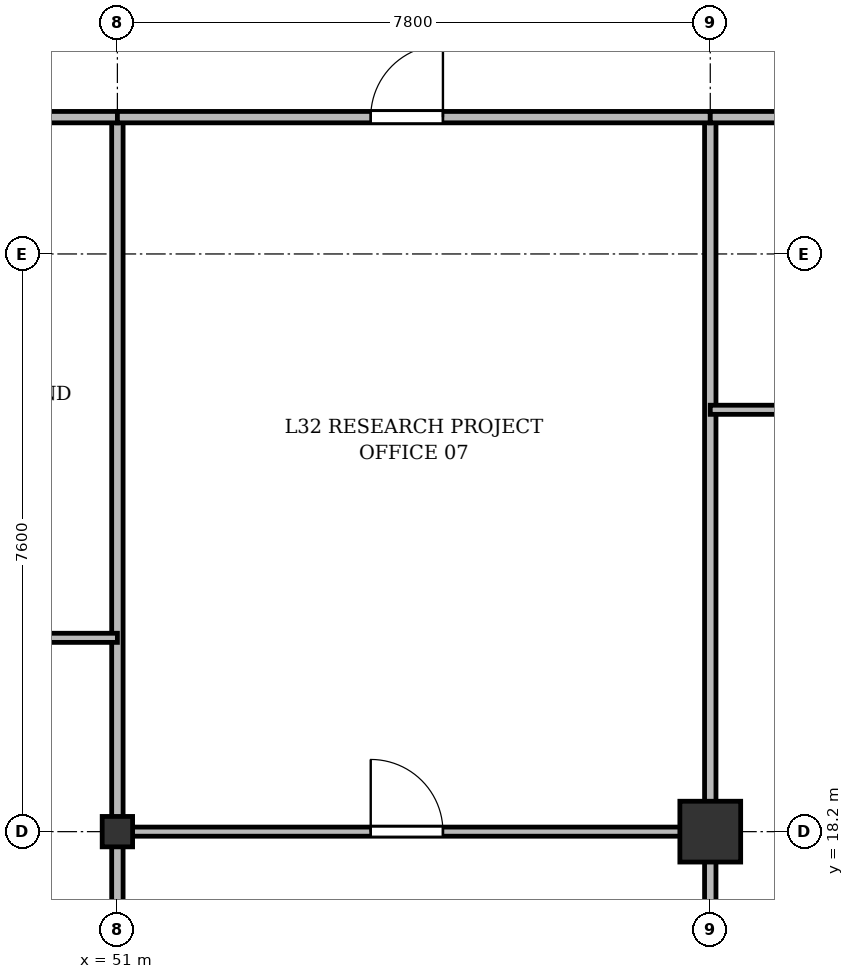
"""IFC4 building model, lengths in metres.
Left out: names, types, materials, properties, quantities, classifications, styles, units other than length and angle.
Written with IfcOpenShell. Run it as: python <this file> out.ifc"""

import sys

from ifc_helpers import new_model, si_unit, direction, frame, frame_2d, origin, origin_2d, place, context, subcontext, project, spatial, rectangle, i_section, extrude, source, transform, mapped, element, fill, save


model = new_model("IFC4")
c1 = context("Model", 3, precision=1e-05, world=origin(), true_north=direction((0.0, 1.0)))
c2 = subcontext(c1, "Body", "Model", "MODEL_VIEW")
j1 = project(units=[si_unit("LENGTHUNIT", "METRE"), si_unit("PLANEANGLEUNIT", "RADIAN")], contexts=[c1])
p1 = place(None, origin())
s1 = spatial("IfcSite", under=j1, at=p1, CompositionType="ELEMENT")
p2 = place(p1, origin())
s2 = spatial("IfcBuilding", under=s1, at=p2, CompositionType="ELEMENT")
p3 = place(p2, frame((0.0, 0.0, 124.9)))
s3 = spatial("IfcBuildingStorey", under=s2, at=p3, CompositionType="ELEMENT", Elevation=124.9)
m1 = source(origin(), c2, "Body", "SweptSolid", [
    extrude(i_section(OverallWidth=0.4, OverallDepth=0.4, WebThickness=0.022, FlangeThickness=0.035, at=origin_2d()), origin(), (0.0, 0.0, 1.0), 3.6),
])
p4 = place(p3, frame((51.0, 18.2, 0.0), z_axis=(0.0, 0.0, 1.0), x_axis=(1.0, 0.0, 0.0)))
e1 = element("IfcColumn", 1, at=p4, inside=s3, PredefinedType="COLUMN", context=c2, shape_type="MappedRepresentation", body=[
    mapped(m1, transform((0.0, 0.0, 0.0), x_axis=(1.0, 0.0, 0.0), y_axis=(0.0, 1.0, 0.0), z_axis=(0.0, 0.0, 1.0), scale=1.0)),
])
m2 = source(origin(), c2, "Body", "SweptSolid", [
    extrude(rectangle(XDim=0.8, YDim=0.8, at=origin_2d()), origin(), (0.0, 0.0, 1.0), 3.6),
])
p5 = place(p3, frame((58.8, 18.2, 0.0), z_axis=(0.0, 0.0, 1.0), x_axis=(1.0, 0.0, 0.0)))
e2 = element("IfcColumn", 2, at=p5, inside=s3, PredefinedType="COLUMN", context=c2, shape_type="MappedRepresentation", body=[
    mapped(m2, transform((0.0, 0.0, 0.0), x_axis=(1.0, 0.0, 0.0), y_axis=(0.0, 1.0, 0.0), z_axis=(0.0, 0.0, 1.0), scale=1.0)),
])
p6 = place(p3, frame((51.0, 6.41, 0.0), z_axis=(0.0, 0.0, 1.0), x_axis=(0.0, 1.0, 0.0)))
e3 = element("IfcWall", 3, at=p6, inside=s3, PredefinedType="PARTITIONING", context=c2, shape_type="SweptSolid", body=[
    extrude(rectangle(XDim=21.19, YDim=0.15, at=frame_2d((10.595, 0.0))), origin(), (0.0, 0.0, 1.0), 2.84),
])
p7 = place(p3, frame((58.8, 3.145, 0.0), z_axis=(0.0, 0.0, 1.0), x_axis=(0.0, 1.0, 0.0)))
e4 = element("IfcWall", 4, at=p7, inside=s3, PredefinedType="PARTITIONING", context=c2, shape_type="SweptSolid", body=[
    extrude(rectangle(XDim=24.455, YDim=0.15, at=frame_2d((12.228, 0.0))), origin(), (0.0, 0.0, 1.0), 2.84),
])
p8 = place(p3, frame((43.8, 20.75, 0.0), z_axis=(0.0, 0.0, 1.0), x_axis=(1.0, 0.0, 0.0)))
e5 = element("IfcWall", 5, at=p8, inside=s3, PredefinedType="PARTITIONING", context=c2, shape_type="SweptSolid", body=[
    extrude(rectangle(XDim=7.2, YDim=0.12, at=frame_2d((3.6, 0.0))), origin(), (0.0, 0.0, 1.0), 2.84),
])
p9 = place(p8, frame((3.125, 0.0, 0.0)))
e6 = element("IfcOpeningElement", 6, at=p9, cuts=e5, PredefinedType="OPENING", context=c2, shape_type="SweptSolid", body=[
    extrude(rectangle(XDim=0.95, YDim=2.15, at=frame_2d((0.475, 1.075))), frame((0.0, 0.07, 0.0), z_axis=(0.0, -1.0, 0.0), x_axis=(1.0, 0.0, 0.0)), (0.0, 0.0, 1.0), 0.14),
])
p10 = place(p3, frame((43.8, 27.6, 0.0), z_axis=(0.0, 0.0, 1.0), x_axis=(1.0, 0.0, 0.0)))
e7 = element("IfcWall", 7, at=p10, inside=s3, PredefinedType="PARTITIONING", context=c2, shape_type="SweptSolid", body=[
    extrude(rectangle(XDim=7.2, YDim=0.15, at=frame_2d((3.6, 0.0))), origin(), (0.0, 0.0, 1.0), 2.84),
])
p11 = place(p10, frame((4.706, 0.0, 0.0)))
e8 = element("IfcOpeningElement", 8, at=p11, cuts=e7, PredefinedType="OPENING", context=c2, shape_type="SweptSolid", body=[
    extrude(rectangle(XDim=0.95, YDim=2.15, at=frame_2d((0.475, 1.075))), frame((0.0, 0.085, 0.0), z_axis=(0.0, -1.0, 0.0), x_axis=(1.0, 0.0, 0.0)), (0.0, 0.0, 1.0), 0.17),
])
p12 = place(p3, frame((51.0, 27.6, 0.0), z_axis=(0.0, 0.0, 1.0), x_axis=(1.0, 0.0, 0.0)))
e9 = element("IfcWall", 9, at=p12, inside=s3, PredefinedType="PARTITIONING", context=c2, shape_type="SweptSolid", body=[
    extrude(rectangle(XDim=7.8, YDim=0.15, at=frame_2d((3.9, 0.0))), origin(), (0.0, 0.0, 1.0), 2.84),
])
p13 = place(p12, frame((3.333, 0.0, 0.0)))
e10 = element("IfcOpeningElement", 10, at=p13, cuts=e9, PredefinedType="OPENING", context=c2, shape_type="SweptSolid", body=[
    extrude(rectangle(XDim=0.95, YDim=2.15, at=frame_2d((0.475, 1.075))), frame((0.0, 0.085, 0.0), z_axis=(0.0, -1.0, 0.0), x_axis=(1.0, 0.0, 0.0)), (0.0, 0.0, 1.0), 0.17),
])
p14 = place(p3, frame((51.0, 18.2, 0.0), z_axis=(0.0, 0.0, 1.0), x_axis=(1.0, 0.0, 0.0)))
e11 = element("IfcWall", 11, at=p14, inside=s3, PredefinedType="PARTITIONING", context=c2, shape_type="SweptSolid", body=[
    extrude(rectangle(XDim=7.8, YDim=0.12, at=frame_2d((3.9, 0.0))), origin(), (0.0, 0.0, 1.0), 2.752),
])
p15 = place(p14, frame((3.333, 0.0, 0.0)))
e12 = element("IfcOpeningElement", 12, at=p15, cuts=e11, PredefinedType="OPENING", context=c2, shape_type="SweptSolid", body=[
    extrude(rectangle(XDim=0.95, YDim=2.15, at=frame_2d((0.475, 1.075))), frame((0.0, 0.07, 0.0), z_axis=(0.0, -1.0, 0.0), x_axis=(1.0, 0.0, 0.0)), (0.0, 0.0, 1.0), 0.14),
])
p16 = place(p3, frame((58.8, 27.6, 0.0), z_axis=(0.0, 0.0, 1.0), x_axis=(1.0, 0.0, 0.0)))
e13 = element("IfcWall", 13, at=p16, inside=s3, PredefinedType="PARTITIONING", context=c2, shape_type="SweptSolid", body=[
    extrude(rectangle(XDim=6.8, YDim=0.15, at=frame_2d((3.4, 0.0))), origin(), (0.0, 0.0, 1.0), 2.84),
])
p17 = place(p16, frame((2.925, 0.0, 0.0)))
e14 = element("IfcOpeningElement", 14, at=p17, cuts=e13, PredefinedType="OPENING", context=c2, shape_type="SweptSolid", body=[
    extrude(rectangle(XDim=0.95, YDim=2.15, at=frame_2d((0.475, 1.075))), frame((0.0, 0.085, 0.0), z_axis=(0.0, -1.0, 0.0), x_axis=(1.0, 0.0, 0.0)), (0.0, 0.0, 1.0), 0.17),
])
p18 = place(p3, frame((58.8, 23.75, 0.0), z_axis=(0.0, 0.0, 1.0), x_axis=(1.0, 0.0, 0.0)))
e15 = element("IfcWall", 15, at=p18, inside=s3, PredefinedType="PARTITIONING", context=c2, shape_type="SweptSolid", body=[
    extrude(rectangle(XDim=6.8, YDim=0.12, at=frame_2d((3.4, 0.0))), origin(), (0.0, 0.0, 1.0), 2.84),
])
p19 = place(p18, frame((2.925, 0.0, 0.0)))
e16 = element("IfcOpeningElement", 16, at=p19, cuts=e15, PredefinedType="OPENING", context=c2, shape_type="SweptSolid", body=[
    extrude(rectangle(XDim=0.95, YDim=2.15, at=frame_2d((0.475, 1.075))), frame((0.0, 0.07, 0.0), z_axis=(0.0, -1.0, 0.0), x_axis=(1.0, 0.0, 0.0)), (0.0, 0.0, 1.0), 0.14),
])
m3 = source(origin(), c2, "Body", "SweptSolid", [
    extrude(rectangle(XDim=0.95, YDim=2.15, at=frame_2d((0.475, 1.075))), frame((0.0, 0.025, 0.0), z_axis=(0.0, -1.0, 0.0), x_axis=(1.0, 0.0, 0.0)), (0.0, 0.0, 1.0), 0.05),
])
p20 = place(p13, origin())
e17 = element("IfcDoor", 17, at=p20, inside=s3, OperationType="SINGLE_SWING_RIGHT", PredefinedType="DOOR", context=c2, shape_type="MappedRepresentation", body=[
    mapped(m3, transform((0.0, 0.0, 0.0), x_axis=(1.0, 0.0, 0.0), y_axis=(0.0, 1.0, 0.0), z_axis=(0.0, 0.0, 1.0), scale=1.0)),
])
fill(e10, e17)
p21 = place(p15, origin())
e18 = element("IfcDoor", 18, at=p21, inside=s3, OperationType="SINGLE_SWING_LEFT", PredefinedType="DOOR", context=c2, shape_type="MappedRepresentation", body=[
    mapped(m3, transform((0.0, 0.0, 0.0), x_axis=(1.0, 0.0, 0.0), y_axis=(0.0, 1.0, 0.0), z_axis=(0.0, 0.0, 1.0), scale=1.0)),
])
fill(e12, e18)
save(model, sys.argv[1])
